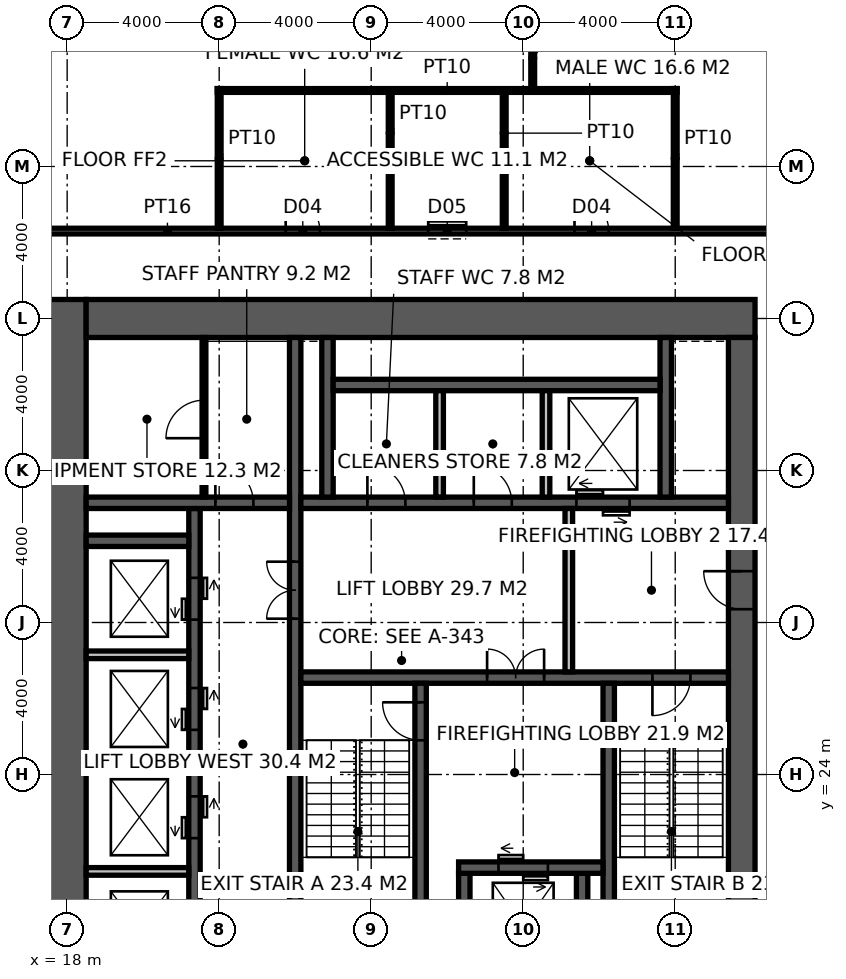
"""IFC4 building model, lengths in metres.
Left out: names, types, materials, properties, quantities, classifications, styles, units other than length and angle.
Written with IfcOpenShell. Run it as: python <this file> out.ifc"""

import sys

from ifc_helpers import new_model, si_unit, direction, frame, frame_2d, origin, place, context, subcontext, project, spatial, rectangle, extrude, element, fill, save


model = new_model("IFC4")
c1 = context("Model", 3, precision=1e-05, world=origin(), true_north=direction((0.0, 1.0)))
c2 = subcontext(c1, "Body", "Model", "MODEL_VIEW")
j1 = project(units=[si_unit("LENGTHUNIT", "METRE"), si_unit("PLANEANGLEUNIT", "RADIAN")], contexts=[c1])
p1 = place(None, origin())
s1 = spatial("IfcSite", under=j1, at=p1, CompositionType="ELEMENT")
p2 = place(p1, origin())
s2 = spatial("IfcBuilding", under=s1, at=p2, CompositionType="ELEMENT")
p3 = place(p2, frame((0.0, 0.0, 274.2)))
s3 = spatial("IfcBuildingStorey", under=s2, at=p3, CompositionType="ELEMENT", Elevation=274.2)
p4 = place(p3, frame((18.0, 17.5, -0.15), z_axis=(0.0, 0.0, 1.0), x_axis=(0.0, 1.0, 0.0)))
e1 = element("IfcWall", 1, at=p4, inside=s3, PredefinedType="SHEAR", context=c2, shape_type="SweptSolid", body=[
    extrude(rectangle(XDim=19.0, YDim=1.0, at=frame_2d((9.5, 0.0))), origin(), (0.0, 0.0, 1.0), 4.0),
])
p5 = place(p3, frame((18.5, 36.0, -0.15), z_axis=(0.0, 0.0, 1.0), x_axis=(1.0, 0.0, 0.0)))
e2 = element("IfcWall", 2, at=p5, inside=s3, PredefinedType="SHEAR", context=c2, shape_type="SweptSolid", body=[
    extrude(rectangle(XDim=17.6, YDim=1.0, at=frame_2d((8.8, 0.0))), origin(), (0.0, 0.0, 1.0), 4.0),
])
p6 = place(p3, frame((35.75, 18.5, -0.15), z_axis=(0.0, 0.0, 1.0), x_axis=(0.0, 1.0, 0.0)))
e3 = element("IfcWall", 3, at=p6, inside=s3, PredefinedType="SHEAR", context=c2, shape_type="SweptSolid", body=[
    extrude(rectangle(XDim=17.0, YDim=0.7, at=frame_2d((8.5, 0.0))), origin(), (0.0, 0.0, 1.0), 4.0),
])
p7 = place(p6, frame((9.85, 0.0, 0.15)))
e4 = element("IfcOpeningElement", 4, at=p7, cuts=e3, PredefinedType="OPENING", context=c2, shape_type="SweptSolid", body=[
    extrude(rectangle(XDim=1.0, YDim=2.2, at=frame_2d((0.5, 1.1))), frame((0.0, 0.36, 0.0), z_axis=(0.0, -1.0, 0.0), x_axis=(1.0, 0.0, 0.0)), (0.0, 0.0, 1.0), 0.72),
])
p8 = place(p3, frame((24.0, 18.5, -0.15), z_axis=(0.0, 0.0, 1.0), x_axis=(0.0, 1.0, 0.0)))
e5 = element("IfcWall", 5, at=p8, inside=s3, PredefinedType="SHEAR", context=c2, shape_type="SweptSolid", body=[
    extrude(rectangle(XDim=17.0, YDim=0.3, at=frame_2d((8.5, 0.0))), origin(), (0.0, 0.0, 1.0), 4.0),
])
p9 = place(p8, frame((9.6, 0.0, 0.15)))
e6 = element("IfcOpeningElement", 6, at=p9, cuts=e5, PredefinedType="OPENING", context=c2, shape_type="SweptSolid", body=[
    extrude(rectangle(XDim=1.5, YDim=2.4, at=frame_2d((0.75, 1.2))), frame((0.0, 0.16, 0.0), z_axis=(0.0, -1.0, 0.0), x_axis=(1.0, 0.0, 0.0)), (0.0, 0.0, 1.0), 0.32),
])
p10 = place(p3, frame((24.15, 26.55, -0.15), z_axis=(0.0, 0.0, 1.0), x_axis=(1.0, 0.0, 0.0)))
e7 = element("IfcWall", 7, at=p10, inside=s3, PredefinedType="SHEAR", context=c2, shape_type="SweptSolid", body=[
    extrude(rectangle(XDim=11.25, YDim=0.3, at=frame_2d((5.625, 0.0))), origin(), (0.0, 0.0, 1.0), 4.0),
])
p11 = place(p10, frame((9.25, 0.0, 0.15)))
e8 = element("IfcOpeningElement", 8, at=p11, cuts=e7, PredefinedType="OPENING", context=c2, shape_type="SweptSolid", body=[
    extrude(rectangle(XDim=1.0, YDim=2.2, at=frame_2d((0.5, 1.1))), frame((0.0, 0.16, 0.0), z_axis=(0.0, -1.0, 0.0), x_axis=(1.0, 0.0, 0.0)), (0.0, 0.0, 1.0), 0.32),
])
p12 = place(p10, frame((4.9, 0.0, 0.15)))
e9 = element("IfcOpeningElement", 9, at=p12, cuts=e7, PredefinedType="OPENING", context=c2, shape_type="SweptSolid", body=[
    extrude(rectangle(XDim=1.5, YDim=2.4, at=frame_2d((0.75, 1.2))), frame((0.0, 0.16, 0.0), z_axis=(0.0, -1.0, 0.0), x_axis=(1.0, 0.0, 0.0)), (0.0, 0.0, 1.0), 0.32),
])
p13 = place(p3, frame((27.3, 18.5, -0.15), z_axis=(0.0, 0.0, 1.0), x_axis=(0.0, 1.0, 0.0)))
e10 = element("IfcWall", 10, at=p13, inside=s3, PredefinedType="SHEAR", context=c2, shape_type="SweptSolid", body=[
    extrude(rectangle(XDim=7.9, YDim=0.3, at=frame_2d((3.95, 0.0))), origin(), (0.0, 0.0, 1.0), 4.0),
])
p14 = place(p13, frame((6.4, 0.0, 0.15)))
e11 = element("IfcOpeningElement", 11, at=p14, cuts=e10, PredefinedType="OPENING", context=c2, shape_type="SweptSolid", body=[
    extrude(rectangle(XDim=1.0, YDim=2.2, at=frame_2d((0.5, 1.1))), frame((0.0, 0.16, 0.0), z_axis=(0.0, -1.0, 0.0), x_axis=(1.0, 0.0, 0.0)), (0.0, 0.0, 1.0), 0.32),
])
p15 = place(p3, frame((32.25, 18.5, -0.15), z_axis=(0.0, 0.0, 1.0), x_axis=(0.0, 1.0, 0.0)))
e12 = element("IfcWall", 12, at=p15, inside=s3, PredefinedType="SHEAR", context=c2, shape_type="SweptSolid", body=[
    extrude(rectangle(XDim=7.9, YDim=0.3, at=frame_2d((3.95, 0.0))), origin(), (0.0, 0.0, 1.0), 4.0),
])
for number, where, z_axis, x_axis in (
    (13, (28.45, 18.5, -0.15), (0.0, 0.0, 1.0), (0.0, 1.0, 0.0)),
    (14, (31.55, 18.5, -0.15), (0.0, 0.0, 1.0), (0.0, 1.0, 0.0)),
):
    element("IfcWall", number, at=place(p3, frame(where, z_axis=z_axis, x_axis=x_axis)), inside=s3, PredefinedType="SHEAR", context=c2, shape_type="SweptSolid", body=[
        extrude(rectangle(XDim=2.9, YDim=0.3, at=frame_2d((1.45, 0.0))), origin(), (0.0, 0.0, 1.0), 4.0),
    ])
p16 = place(p3, frame((28.3, 21.55, -0.15), z_axis=(0.0, 0.0, 1.0), x_axis=(1.0, 0.0, 0.0)))
e15 = element("IfcWall", 15, at=p16, inside=s3, PredefinedType="SHEAR", context=c2, shape_type="SweptSolid", body=[
    extrude(rectangle(XDim=3.8, YDim=0.3, at=frame_2d((1.9, 0.0))), origin(), (0.0, 0.0, 1.0), 4.0),
])
p17 = place(p16, frame((1.05, 0.0, 0.15)))
e16 = element("IfcOpeningElement", 16, at=p17, cuts=e15, PredefinedType="OPENING", context=c2, shape_type="SweptSolid", body=[
    extrude(rectangle(XDim=1.3, YDim=2.4, at=frame_2d((0.65, 1.2))), frame((0.0, 0.16, 0.0), z_axis=(0.0, -1.0, 0.0), x_axis=(1.0, 0.0, 0.0)), (0.0, 0.0, 1.0), 0.32),
])
p18 = place(p3, frame((24.15, 31.15, -0.15), z_axis=(0.0, 0.0, 1.0), x_axis=(1.0, 0.0, 0.0)))
e17 = element("IfcWall", 17, at=p18, inside=s3, PredefinedType="SHEAR", context=c2, shape_type="SweptSolid", body=[
    extrude(rectangle(XDim=11.25, YDim=0.3, at=frame_2d((5.625, 0.0))), origin(), (0.0, 0.0, 1.0), 4.0),
])
p19 = place(p18, frame((1.75, 0.0, 0.15)))
e18 = element("IfcOpeningElement", 18, at=p19, cuts=e17, PredefinedType="OPENING", context=c2, shape_type="SweptSolid", body=[
    extrude(rectangle(XDim=1.0, YDim=2.2, at=frame_2d((0.5, 1.1))), frame((0.0, 0.16, 0.0), z_axis=(0.0, -1.0, 0.0), x_axis=(1.0, 0.0, 0.0)), (0.0, 0.0, 1.0), 0.32),
])
p20 = place(p18, frame((4.55, 0.0, 0.15)))
e19 = element("IfcOpeningElement", 19, at=p20, cuts=e17, PredefinedType="OPENING", context=c2, shape_type="SweptSolid", body=[
    extrude(rectangle(XDim=1.0, YDim=2.2, at=frame_2d((0.5, 1.1))), frame((0.0, 0.16, 0.0), z_axis=(0.0, -1.0, 0.0), x_axis=(1.0, 0.0, 0.0)), (0.0, 0.0, 1.0), 0.32),
])
p21 = place(p18, frame((7.25, 0.0, 0.15)))
e20 = element("IfcOpeningElement", 20, at=p21, cuts=e17, PredefinedType="OPENING", context=c2, shape_type="SweptSolid", body=[
    extrude(rectangle(XDim=1.4, YDim=2.4, at=frame_2d((0.7, 1.2))), frame((0.0, 0.16, 0.0), z_axis=(0.0, -1.0, 0.0), x_axis=(1.0, 0.0, 0.0)), (0.0, 0.0, 1.0), 0.32),
])
p22 = place(p3, frame((21.35, 18.5, -0.15), z_axis=(0.0, 0.0, 1.0), x_axis=(0.0, 1.0, 0.0)))
e21 = element("IfcWall", 21, at=p22, inside=s3, PredefinedType="SHEAR", context=c2, shape_type="SweptSolid", body=[
    extrude(rectangle(XDim=12.5, YDim=0.3, at=frame_2d((6.25, 0.0))), origin(), (0.0, 0.0, 1.0), 4.0),
])
p23 = place(p22, frame((0.875, 0.0, 0.15)))
e22 = element("IfcOpeningElement", 22, at=p23, cuts=e21, PredefinedType="OPENING", context=c2, shape_type="SweptSolid", body=[
    extrude(rectangle(XDim=1.1, YDim=2.2, at=frame_2d((0.55, 1.1))), frame((0.0, 0.16, 0.0), z_axis=(0.0, -1.0, 0.0), x_axis=(1.0, 0.0, 0.0)), (0.0, 0.0, 1.0), 0.32),
])
p24 = place(p22, frame((3.825, 0.0, 0.15)))
e23 = element("IfcOpeningElement", 23, at=p24, cuts=e21, PredefinedType="OPENING", context=c2, shape_type="SweptSolid", body=[
    extrude(rectangle(XDim=1.1, YDim=2.2, at=frame_2d((0.55, 1.1))), frame((0.0, 0.16, 0.0), z_axis=(0.0, -1.0, 0.0), x_axis=(1.0, 0.0, 0.0)), (0.0, 0.0, 1.0), 0.32),
])
p25 = place(p22, frame((6.675, 0.0, 0.15)))
e24 = element("IfcOpeningElement", 24, at=p25, cuts=e21, PredefinedType="OPENING", context=c2, shape_type="SweptSolid", body=[
    extrude(rectangle(XDim=1.1, YDim=2.2, at=frame_2d((0.55, 1.1))), frame((0.0, 0.16, 0.0), z_axis=(0.0, -1.0, 0.0), x_axis=(1.0, 0.0, 0.0)), (0.0, 0.0, 1.0), 0.32),
])
p26 = place(p22, frame((9.575, 0.0, 0.15)))
e25 = element("IfcOpeningElement", 25, at=p26, cuts=e21, PredefinedType="OPENING", context=c2, shape_type="SweptSolid", body=[
    extrude(rectangle(XDim=1.1, YDim=2.2, at=frame_2d((0.55, 1.1))), frame((0.0, 0.16, 0.0), z_axis=(0.0, -1.0, 0.0), x_axis=(1.0, 0.0, 0.0)), (0.0, 0.0, 1.0), 0.32),
])
p27 = place(p3, frame((18.5, 31.15, -0.15), z_axis=(0.0, 0.0, 1.0), x_axis=(1.0, 0.0, 0.0)))
e26 = element("IfcWall", 26, at=p27, inside=s3, PredefinedType="SHEAR", context=c2, shape_type="SweptSolid", body=[
    extrude(rectangle(XDim=5.35, YDim=0.3, at=frame_2d((2.675, 0.0))), origin(), (0.0, 0.0, 1.0), 4.0),
])
p28 = place(p27, frame((3.4, 0.0, 0.15)))
e27 = element("IfcOpeningElement", 27, at=p28, cuts=e26, PredefinedType="OPENING", context=c2, shape_type="SweptSolid", body=[
    extrude(rectangle(XDim=1.0, YDim=2.2, at=frame_2d((0.5, 1.1))), frame((0.0, 0.16, 0.0), z_axis=(0.0, -1.0, 0.0), x_axis=(1.0, 0.0, 0.0)), (0.0, 0.0, 1.0), 0.32),
])
p29 = place(p3, frame((18.5, 30.15, -0.15), z_axis=(0.0, 0.0, 1.0), x_axis=(1.0, 0.0, 0.0)))
e28 = element("IfcWall", 28, at=p29, inside=s3, PredefinedType="SHEAR", context=c2, shape_type="SweptSolid", body=[
    extrude(rectangle(XDim=2.7, YDim=0.3, at=frame_2d((1.35, 0.0))), origin(), (0.0, 0.0, 1.0), 4.0),
])
for number, where, z_axis, x_axis in (
    (29, (24.85, 31.3, -0.15), (0.0, 0.0, 1.0), (0.0, 1.0, 0.0)),
    (30, (33.75, 31.3, -0.15), (0.0, 0.0, 1.0), (0.0, 1.0, 0.0)),
):
    element("IfcWall", number, at=place(p3, frame(where, z_axis=z_axis, x_axis=x_axis)), inside=s3, PredefinedType="SHEAR", context=c2, shape_type="SweptSolid", body=[
        extrude(rectangle(XDim=4.2, YDim=0.3, at=frame_2d((2.1, 0.0))), origin(), (0.0, 0.0, 1.0), 4.0),
    ])
p30 = place(p3, frame((25.0, 34.25, -0.15), z_axis=(0.0, 0.0, 1.0), x_axis=(1.0, 0.0, 0.0)))
e31 = element("IfcWall", 31, at=p30, inside=s3, PredefinedType="SHEAR", context=c2, shape_type="SweptSolid", body=[
    extrude(rectangle(XDim=8.6, YDim=0.3, at=frame_2d((4.3, 0.0))), origin(), (0.0, 0.0, 1.0), 4.0),
])
p31 = place(p3, frame((27.8, 31.3, 0.0), z_axis=(0.0, 0.0, 1.0), x_axis=(0.0, 1.0, 0.0)))
e32 = element("IfcWall", 32, at=p31, inside=s3, PredefinedType="SOLIDWALL", context=c2, shape_type="SweptSolid", body=[
    extrude(rectangle(XDim=2.8, YDim=0.2, at=frame_2d((1.4, 0.0))), origin(), (0.0, 0.0, 1.0), 3.85),
])
p32 = place(p3, frame((30.6, 31.3, -0.15), z_axis=(0.0, 0.0, 1.0), x_axis=(0.0, 1.0, 0.0)))
e33 = element("IfcWall", 33, at=p32, inside=s3, PredefinedType="SOLIDWALL", context=c2, shape_type="SweptSolid", body=[
    extrude(rectangle(XDim=2.8, YDim=0.2, at=frame_2d((1.4, 0.0))), origin(), (0.0, 0.0, 1.0), 4.0),
])
for number, where, z_axis, x_axis in (
    (34, (18.5, 21.45, -0.15), (0.0, 0.0, 1.0), (1.0, 0.0, 0.0)),
    (35, (18.5, 24.3, -0.15), (0.0, 0.0, 1.0), (1.0, 0.0, 0.0)),
    (36, (18.5, 27.15, -0.15), (0.0, 0.0, 1.0), (1.0, 0.0, 0.0)),
):
    element("IfcWall", number, at=place(p3, frame(where, z_axis=z_axis, x_axis=x_axis)), inside=s3, PredefinedType="SOLIDWALL", context=c2, shape_type="SweptSolid", body=[
        extrude(rectangle(XDim=2.7, YDim=0.2, at=frame_2d((1.35, 0.0))), origin(), (0.0, 0.0, 1.0), 4.0),
    ])
p33 = place(p3, frame((31.2, 26.7, 0.0), z_axis=(0.0, 0.0, 1.0), x_axis=(0.0, 1.0, 0.0)))
e37 = element("IfcWall", 37, at=p33, inside=s3, PredefinedType="SOLIDWALL", context=c2, shape_type="SweptSolid", body=[
    extrude(rectangle(XDim=4.3, YDim=0.2, at=frame_2d((2.15, 0.0))), origin(), (0.0, 0.0, 1.0), 3.85),
])
p34 = place(p3, frame((21.6, 31.3, 0.0), z_axis=(0.0, 0.0, 1.0), x_axis=(0.0, 1.0, 0.0)))
e38 = element("IfcWall", 38, at=p34, inside=s3, PredefinedType="PARTITIONING", context=c2, shape_type="SweptSolid", body=[
    extrude(rectangle(XDim=4.2, YDim=0.1, at=frame_2d((2.1, 0.0))), origin(), (0.0, 0.0, 1.0), 3.85),
])
p35 = place(p34, frame((1.55, 0.0, 0.0)))
e39 = element("IfcOpeningElement", 39, at=p35, cuts=e38, PredefinedType="OPENING", context=c2, shape_type="SweptSolid", body=[
    extrude(rectangle(XDim=1.0, YDim=2.2, at=frame_2d((0.5, 1.1))), frame((0.0, 0.06, 0.0), z_axis=(0.0, -1.0, 0.0), x_axis=(1.0, 0.0, 0.0)), (0.0, 0.0, 1.0), 0.12),
])
p36 = place(p3, frame((17.5, 38.3, 0.0), z_axis=(0.0, 0.0, 1.0), x_axis=(1.0, 0.0, 0.0)))
e40 = element("IfcWall", 40, at=p36, inside=s3, PredefinedType="PARTITIONING", context=c2, shape_type="SweptSolid", body=[
    extrude(rectangle(XDim=20.925, YDim=0.15, at=frame_2d((10.462, 0.0))), origin(), (0.0, 0.0, 1.0), 3.85),
])
p37 = place(p36, frame((6.25, 0.0, 0.0)))
e41 = element("IfcOpeningElement", 41, at=p37, cuts=e40, PredefinedType="OPENING", context=c2, shape_type="SweptSolid", body=[
    extrude(rectangle(XDim=0.9, YDim=2.1, at=frame_2d((0.45, 1.05))), frame((0.0, 0.085, 0.0), z_axis=(0.0, -1.0, 0.0), x_axis=(1.0, 0.0, 0.0)), (0.0, 0.0, 1.0), 0.17),
])
p38 = place(p36, frame((10.0, 0.0, 0.0)))
e42 = element("IfcOpeningElement", 42, at=p38, cuts=e40, PredefinedType="OPENING", context=c2, shape_type="SweptSolid", body=[
    extrude(rectangle(XDim=1.0, YDim=2.1, at=frame_2d((0.5, 1.05))), frame((0.0, 0.085, 0.0), z_axis=(0.0, -1.0, 0.0), x_axis=(1.0, 0.0, 0.0)), (0.0, 0.0, 1.0), 0.17),
])
p39 = place(p36, frame((13.85, 0.0, 0.0)))
e43 = element("IfcOpeningElement", 43, at=p39, cuts=e40, PredefinedType="OPENING", context=c2, shape_type="SweptSolid", body=[
    extrude(rectangle(XDim=0.9, YDim=2.1, at=frame_2d((0.45, 1.05))), frame((0.0, 0.085, 0.0), z_axis=(0.0, -1.0, 0.0), x_axis=(1.0, 0.0, 0.0)), (0.0, 0.0, 1.0), 0.17),
])
for number, where, z_axis, x_axis in (
    (44, (22.0, 38.375, 0.0), (0.0, 0.0, 1.0), (0.0, 1.0, 0.0)),
    (45, (34.0, 38.375, 0.0), (0.0, 0.0, 1.0), (0.0, 1.0, 0.0)),
):
    element("IfcWall", number, at=place(p3, frame(where, z_axis=z_axis, x_axis=x_axis)), inside=s3, PredefinedType="PARTITIONING", context=c2, shape_type="SweptSolid", body=[
        extrude(rectangle(XDim=3.675, YDim=0.1, at=frame_2d((1.837, 0.0))), origin(), (0.0, 0.0, 1.0), 2.95),
    ])
p40 = place(p3, frame((21.95, 42.0, 0.0), z_axis=(0.0, 0.0, 1.0), x_axis=(1.0, 0.0, 0.0)))
e46 = element("IfcWall", 46, at=p40, inside=s3, PredefinedType="PARTITIONING", context=c2, shape_type="SweptSolid", body=[
    extrude(rectangle(XDim=12.1, YDim=0.1, at=frame_2d((6.05, 0.0))), origin(), (0.0, 0.0, 1.0), 3.85),
])
for number, where, z_axis, x_axis in (
    (47, (26.5, 38.375, 0.0), (0.0, 0.0, 1.0), (0.0, 1.0, 0.0)),
    (48, (29.5, 38.375, 0.0), (0.0, 0.0, 1.0), (0.0, 1.0, 0.0)),
):
    element("IfcWall", number, at=place(p3, frame(where, z_axis=z_axis, x_axis=x_axis)), inside=s3, PredefinedType="PARTITIONING", context=c2, shape_type="SweptSolid", body=[
        extrude(rectangle(XDim=3.575, YDim=0.1, at=frame_2d((1.788, 0.0))), origin(), (0.0, 0.0, 1.0), 3.85),
    ])
p41 = place(p3, frame((30.25, 43.7, 0.0), z_axis=(0.0, 0.0, 1.0), x_axis=(0.0, -1.0, 0.0)))
e49 = element("IfcWall", 49, at=p41, inside=s3, PredefinedType="PARTITIONING", context=c2, shape_type="SweptSolid", body=[
    extrude(rectangle(XDim=1.7, YDim=0.1, at=frame_2d((0.85, 0.0))), origin(), (0.0, 0.0, 1.0), 2.95),
])
p42 = place(p14, origin())
e50 = element("IfcDoor", 50, at=p42, inside=s3, OperationType="SINGLE_SWING_RIGHT", PredefinedType="DOOR", context=c2, shape_type="SweptSolid", body=[
    extrude(rectangle(XDim=1.0, YDim=2.2, at=frame_2d((0.5, 1.1))), frame((0.0, 0.025, 0.0), z_axis=(0.0, -1.0, 0.0), x_axis=(1.0, 0.0, 0.0)), (0.0, 0.0, 1.0), 0.05),
])
fill(e11, e50)
p43 = place(p11, frame((1.0, 0.0, 0.0), z_axis=(0.0, 0.0, 1.0), x_axis=(-1.0, 0.0, 0.0)))
e51 = element("IfcDoor", 51, at=p43, inside=s3, OperationType="SINGLE_SWING_RIGHT", PredefinedType="DOOR", context=c2, shape_type="SweptSolid", body=[
    extrude(rectangle(XDim=1.0, YDim=2.2, at=frame_2d((0.5, 1.1))), frame((0.0, 0.025, 0.0), z_axis=(0.0, -1.0, 0.0), x_axis=(1.0, 0.0, 0.0)), (0.0, 0.0, 1.0), 0.05),
])
fill(e8, e51)
p44 = place(p7, origin())
e52 = element("IfcDoor", 52, at=p44, inside=s3, OperationType="SINGLE_SWING_RIGHT", PredefinedType="DOOR", context=c2, shape_type="SweptSolid", body=[
    extrude(rectangle(XDim=1.0, YDim=2.2, at=frame_2d((0.5, 1.1))), frame((0.0, 0.025, 0.0), z_axis=(0.0, -1.0, 0.0), x_axis=(1.0, 0.0, 0.0)), (0.0, 0.0, 1.0), 0.05),
])
fill(e4, e52)
p45 = place(p12, origin())
e53 = element("IfcDoor", 53, at=p45, inside=s3, OperationType="DOUBLE_DOOR_DOUBLE_SWING", PredefinedType="DOOR", context=c2, shape_type="SweptSolid", body=[
    extrude(rectangle(XDim=1.5, YDim=2.4, at=frame_2d((0.75, 1.2))), frame((0.0, 0.025, 0.0), z_axis=(0.0, -1.0, 0.0), x_axis=(1.0, 0.0, 0.0)), (0.0, 0.0, 1.0), 0.05),
])
fill(e9, e53)
p46 = place(p9, origin())
e54 = element("IfcDoor", 54, at=p46, inside=s3, OperationType="DOUBLE_DOOR_DOUBLE_SWING", PredefinedType="DOOR", context=c2, shape_type="SweptSolid", body=[
    extrude(rectangle(XDim=1.5, YDim=2.4, at=frame_2d((0.75, 1.2))), frame((0.0, 0.025, 0.0), z_axis=(0.0, -1.0, 0.0), x_axis=(1.0, 0.0, 0.0)), (0.0, 0.0, 1.0), 0.05),
])
fill(e6, e54)
p47 = place(p28, origin())
e55 = element("IfcDoor", 55, at=p47, inside=s3, OperationType="SINGLE_SWING_LEFT", PredefinedType="DOOR", context=c2, shape_type="SweptSolid", body=[
    extrude(rectangle(XDim=1.0, YDim=2.2, at=frame_2d((0.5, 1.1))), frame((0.0, 0.025, 0.0), z_axis=(0.0, -1.0, 0.0), x_axis=(1.0, 0.0, 0.0)), (0.0, 0.0, 1.0), 0.05),
])
fill(e27, e55)
p48 = place(p35, origin())
e56 = element("IfcDoor", 56, at=p48, inside=s3, OperationType="SINGLE_SWING_LEFT", PredefinedType="DOOR", context=c2, shape_type="SweptSolid", body=[
    extrude(rectangle(XDim=1.0, YDim=2.2, at=frame_2d((0.5, 1.1))), frame((0.0, 0.025, 0.0), z_axis=(0.0, -1.0, 0.0), x_axis=(1.0, 0.0, 0.0)), (0.0, 0.0, 1.0), 0.05),
])
fill(e39, e56)
p49 = place(p19, origin())
e57 = element("IfcDoor", 57, at=p49, inside=s3, OperationType="SINGLE_SWING_LEFT", PredefinedType="DOOR", context=c2, shape_type="SweptSolid", body=[
    extrude(rectangle(XDim=1.0, YDim=2.2, at=frame_2d((0.5, 1.1))), frame((0.0, 0.025, 0.0), z_axis=(0.0, -1.0, 0.0), x_axis=(1.0, 0.0, 0.0)), (0.0, 0.0, 1.0), 0.05),
])
fill(e18, e57)
p50 = place(p20, origin())
e58 = element("IfcDoor", 58, at=p50, inside=s3, OperationType="SINGLE_SWING_LEFT", PredefinedType="DOOR", context=c2, shape_type="SweptSolid", body=[
    extrude(rectangle(XDim=1.0, YDim=2.2, at=frame_2d((0.5, 1.1))), frame((0.0, 0.025, 0.0), z_axis=(0.0, -1.0, 0.0), x_axis=(1.0, 0.0, 0.0)), (0.0, 0.0, 1.0), 0.05),
])
fill(e19, e58)
p51 = place(p37, origin())
e59 = element("IfcDoor", 59, at=p51, inside=s3, OperationType="SINGLE_SWING_LEFT", PredefinedType="DOOR", context=c2, shape_type="SweptSolid", body=[
    extrude(rectangle(XDim=0.9, YDim=2.1, at=frame_2d((0.45, 1.05))), frame((0.0, 0.025, 0.0), z_axis=(0.0, -1.0, 0.0), x_axis=(1.0, 0.0, 0.0)), (0.0, 0.0, 1.0), 0.05),
])
fill(e41, e59)
p52 = place(p38, origin())
e60 = element("IfcDoor", 60, at=p52, inside=s3, OperationType="SLIDING_TO_LEFT", PredefinedType="DOOR", context=c2, shape_type="SweptSolid", body=[
    extrude(rectangle(XDim=1.0, YDim=2.1, at=frame_2d((0.5, 1.05))), frame((0.0, 0.025, 0.0), z_axis=(0.0, -1.0, 0.0), x_axis=(1.0, 0.0, 0.0)), (0.0, 0.0, 1.0), 0.05),
])
fill(e42, e60)
p53 = place(p39, origin())
e61 = element("IfcDoor", 61, at=p53, inside=s3, OperationType="SINGLE_SWING_LEFT", PredefinedType="DOOR", context=c2, shape_type="SweptSolid", body=[
    extrude(rectangle(XDim=0.9, YDim=2.1, at=frame_2d((0.45, 1.05))), frame((0.0, 0.025, 0.0), z_axis=(0.0, -1.0, 0.0), x_axis=(1.0, 0.0, 0.0)), (0.0, 0.0, 1.0), 0.05),
])
fill(e43, e61)
p54 = place(p17, origin())
e62 = element("IfcDoor", 62, at=p54, inside=s3, OperationType="DOUBLE_DOOR_SLIDING", PredefinedType="DOOR", context=c2, shape_type="SweptSolid", body=[
    extrude(rectangle(XDim=1.3, YDim=2.4, at=frame_2d((0.65, 1.2))), frame((0.0, 0.025, 0.0), z_axis=(0.0, -1.0, 0.0), x_axis=(1.0, 0.0, 0.0)), (0.0, 0.0, 1.0), 0.05),
])
fill(e16, e62)
p55 = place(p21, origin())
e63 = element("IfcDoor", 63, at=p55, inside=s3, OperationType="DOUBLE_DOOR_SLIDING", PredefinedType="DOOR", context=c2, shape_type="SweptSolid", body=[
    extrude(rectangle(XDim=1.4, YDim=2.4, at=frame_2d((0.7, 1.2))), frame((0.0, 0.025, 0.0), z_axis=(0.0, -1.0, 0.0), x_axis=(1.0, 0.0, 0.0)), (0.0, 0.0, 1.0), 0.05),
])
fill(e20, e63)
p56 = place(p24, origin())
e64 = element("IfcDoor", 64, at=p56, inside=s3, OperationType="DOUBLE_DOOR_SLIDING", PredefinedType="DOOR", context=c2, shape_type="SweptSolid", body=[
    extrude(rectangle(XDim=1.1, YDim=2.2, at=frame_2d((0.55, 1.1))), frame((0.0, 0.025, 0.0), z_axis=(0.0, -1.0, 0.0), x_axis=(1.0, 0.0, 0.0)), (0.0, 0.0, 1.0), 0.05),
])
fill(e23, e64)
p57 = place(p25, origin())
e65 = element("IfcDoor", 65, at=p57, inside=s3, OperationType="DOUBLE_DOOR_SLIDING", PredefinedType="DOOR", context=c2, shape_type="SweptSolid", body=[
    extrude(rectangle(XDim=1.1, YDim=2.2, at=frame_2d((0.55, 1.1))), frame((0.0, 0.025, 0.0), z_axis=(0.0, -1.0, 0.0), x_axis=(1.0, 0.0, 0.0)), (0.0, 0.0, 1.0), 0.05),
])
fill(e24, e65)
p58 = place(p26, origin())
e66 = element("IfcDoor", 66, at=p58, inside=s3, OperationType="DOUBLE_DOOR_SLIDING", PredefinedType="DOOR", context=c2, shape_type="SweptSolid", body=[
    extrude(rectangle(XDim=1.1, YDim=2.2, at=frame_2d((0.55, 1.1))), frame((0.0, 0.025, 0.0), z_axis=(0.0, -1.0, 0.0), x_axis=(1.0, 0.0, 0.0)), (0.0, 0.0, 1.0), 0.05),
])
fill(e25, e66)
save(model, sys.argv[1])
